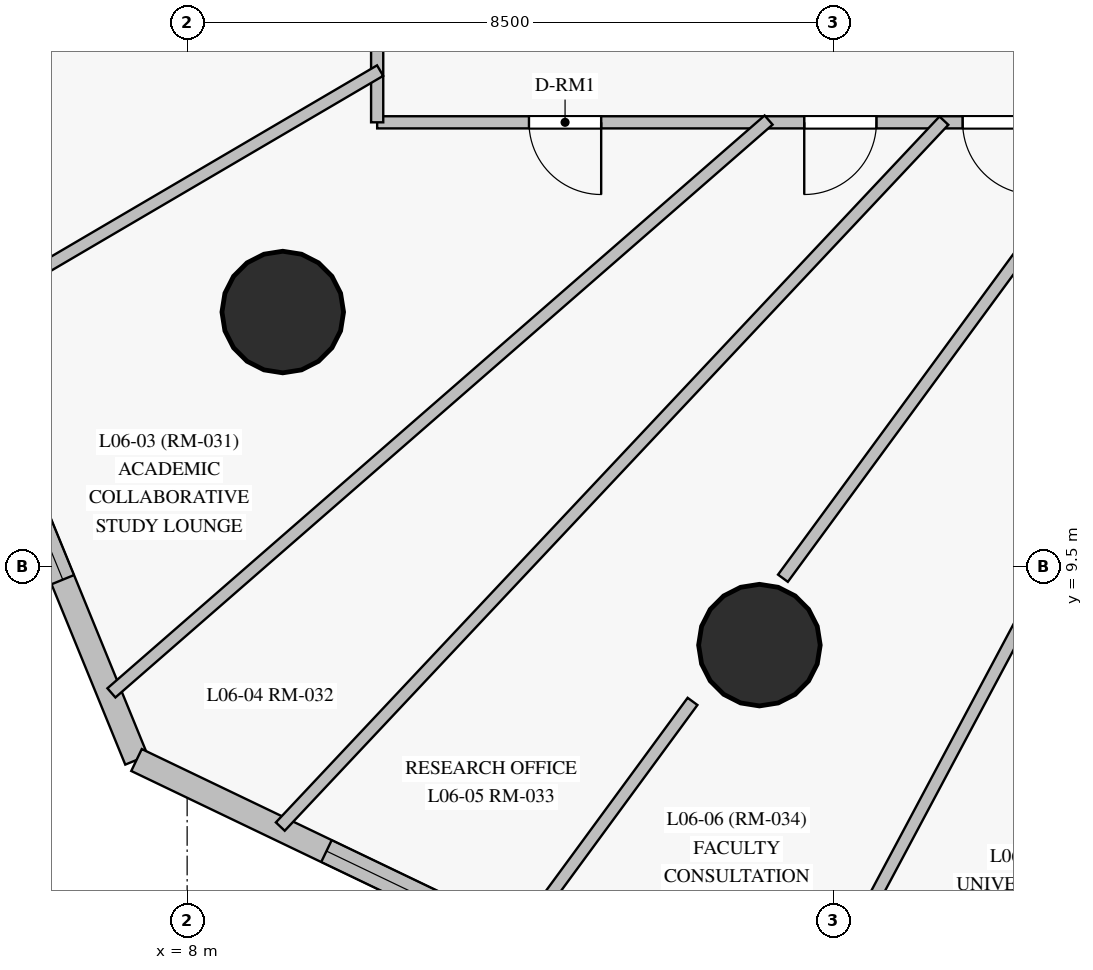
"""IFC4 building model, lengths in metres.
Left out: names, types, materials, properties, quantities, classifications, styles, units other than length and angle.
Written with IfcOpenShell. Run it as: python <this file> out.ifc"""

import sys

from ifc_helpers import new_model, si_unit, direction, frame, frame_2d, origin, origin_with_axes, origin_2d, place, context, subcontext, project, spatial, rectangle, circle, extrude, source, transform, mapped, element, fill, save


model = new_model("IFC4")
c1 = context("Model", 3, precision=1e-05, world=origin(), true_north=direction((0.0, 1.0)))
c2 = subcontext(c1, "Body", "Model", "MODEL_VIEW")
j1 = project(units=[si_unit("LENGTHUNIT", "METRE"), si_unit("PLANEANGLEUNIT", "RADIAN")], contexts=[c1])
p1 = place(None, origin())
s1 = spatial("IfcSite", under=j1, at=p1, CompositionType="ELEMENT")
p2 = place(p1, origin())
s2 = spatial("IfcBuilding", under=s1, at=p2, CompositionType="ELEMENT")
p3 = place(p2, frame((0.0, 0.0, 26.5)))
s3 = spatial("IfcBuildingStorey", under=s2, at=p3, CompositionType="ELEMENT", Elevation=26.5)
m1 = source(origin_with_axes(), c2, "Body", "SweptSolid", [
    extrude(circle(Radius=0.8, at=origin_2d()), origin(), (0.0, 0.0, 1.0), 3.6),
])
for number, where, z_axis, x_axis in (
    (1, (9.258, 12.854, 0.0), (0.0, 0.0, 1.0), (1.0, 0.0, 0.0)),
    (2, (15.529, 8.472, 0.0), (0.0, 0.0, 1.0), (1.0, 0.0, 0.0)),
):
    element("IfcColumn", number, at=place(p3, frame(where, z_axis=z_axis, x_axis=x_axis)), inside=s3, PredefinedType="COLUMN", context=c2, shape_type="MappedRepresentation", body=[
        mapped(m1, transform((0.0, 0.0, 0.0), scale=1.0)),
    ])
p4 = place(p3, frame((2.236, 19.429, 0.0), z_axis=(0.0, 0.0, 1.0), x_axis=(0.378495223181, -0.925603244392, 0.0)))
e3 = element("IfcWall", 3, at=p4, inside=s3, PredefinedType="SOLIDWALL", context=c2, shape_type="SweptSolid", body=[
    extrude(rectangle(XDim=13.47, YDim=0.32, at=frame_2d((6.735, 0.0))), origin(), (0.0, 0.0, 1.0), 3.35),
])
p5 = place(p4, frame((2.579, 0.0, 0.85)))
e4 = element("IfcOpeningElement", 4, at=p5, cuts=e3, PredefinedType="OPENING", context=c2, shape_type="SweptSolid", body=[
    extrude(rectangle(XDim=2.1, YDim=1.95, at=frame_2d((1.05, 0.975))), frame((0.0, 0.17, 0.0), z_axis=(0.0, -1.0, 0.0), x_axis=(1.0, 0.0, 0.0)), (0.0, 0.0, 1.0), 0.34),
])
p6 = place(p4, frame((8.807, 0.0, 0.85)))
e5 = element("IfcOpeningElement", 5, at=p6, cuts=e3, PredefinedType="OPENING", context=c2, shape_type="SweptSolid", body=[
    extrude(rectangle(XDim=2.1, YDim=1.95, at=frame_2d((1.05, 0.975))), frame((0.0, 0.17, 0.0), z_axis=(0.0, -1.0, 0.0), x_axis=(1.0, 0.0, 0.0)), (0.0, 0.0, 1.0), 0.34),
])
p7 = place(p3, frame((7.334, 6.961, 0.0), z_axis=(0.0, 0.0, 1.0), x_axis=(0.901738594253, -0.432281745664, 0.0)))
e6 = element("IfcWall", 6, at=p7, inside=s3, PredefinedType="SOLIDWALL", context=c2, shape_type="SweptSolid", body=[
    extrude(rectangle(XDim=10.83, YDim=0.32, at=frame_2d((5.415, 0.0))), origin(), (0.0, 0.0, 1.0), 3.35),
])
p8 = place(p7, frame((2.771, 0.0, 0.85)))
e7 = element("IfcOpeningElement", 7, at=p8, cuts=e6, PredefinedType="OPENING", context=c2, shape_type="SweptSolid", body=[
    extrude(rectangle(XDim=2.1, YDim=1.95, at=frame_2d((1.05, 0.975))), frame((0.0, 0.17, 0.0), z_axis=(0.0, -1.0, 0.0), x_axis=(1.0, 0.0, 0.0)), (0.0, 0.0, 1.0), 0.34),
])
p9 = place(p7, frame((6.439, 0.0, 0.85)))
e8 = element("IfcOpeningElement", 8, at=p9, cuts=e6, PredefinedType="OPENING", context=c2, shape_type="SweptSolid", body=[
    extrude(rectangle(XDim=2.1, YDim=1.95, at=frame_2d((1.05, 0.975))), frame((0.0, 0.17, 0.0), z_axis=(0.0, -1.0, 0.0), x_axis=(1.0, 0.0, 0.0)), (0.0, 0.0, 1.0), 0.34),
])
p10 = place(p3, frame((17.099, 2.279, 0.0), z_axis=(0.0, 0.0, 1.0), x_axis=(0.957423656835, 0.288686579759, 0.0)))
e9 = element("IfcWall", 9, at=p10, inside=s3, PredefinedType="SOLIDWALL", context=c2, shape_type="SweptSolid", body=[
    extrude(rectangle(XDim=16.276, YDim=0.32, at=frame_2d((8.138, 0.0))), origin(), (0.0, 0.0, 1.0), 3.35),
])
p11 = place(p10, frame((1.017, 0.0, 0.85)))
e10 = element("IfcOpeningElement", 10, at=p11, cuts=e9, PredefinedType="OPENING", context=c2, shape_type="SweptSolid", body=[
    extrude(rectangle(XDim=2.1, YDim=1.95, at=frame_2d((1.05, 0.975))), frame((0.0, 0.17, 0.0), z_axis=(0.0, -1.0, 0.0), x_axis=(1.0, 0.0, 0.0)), (0.0, 0.0, 1.0), 0.34),
])
p12 = place(p10, frame((5.208, 0.0, 0.85)))
e11 = element("IfcOpeningElement", 11, at=p12, cuts=e9, PredefinedType="OPENING", context=c2, shape_type="SweptSolid", body=[
    extrude(rectangle(XDim=2.1, YDim=1.95, at=frame_2d((1.05, 0.975))), frame((0.0, 0.17, 0.0), z_axis=(0.0, -1.0, 0.0), x_axis=(1.0, 0.0, 0.0)), (0.0, 0.0, 1.0), 0.34),
])
p13 = place(p10, frame((9.345, 0.0, 0.85)))
e12 = element("IfcOpeningElement", 12, at=p13, cuts=e9, PredefinedType="OPENING", context=c2, shape_type="SweptSolid", body=[
    extrude(rectangle(XDim=2.1, YDim=1.95, at=frame_2d((1.05, 0.975))), frame((0.0, 0.17, 0.0), z_axis=(0.0, -1.0, 0.0), x_axis=(1.0, 0.0, 0.0)), (0.0, 0.0, 1.0), 0.34),
])
p14 = place(p10, frame((12.855, 0.0, 0.85)))
e13 = element("IfcOpeningElement", 13, at=p14, cuts=e9, PredefinedType="OPENING", context=c2, shape_type="SweptSolid", body=[
    extrude(rectangle(XDim=2.1, YDim=1.95, at=frame_2d((1.05, 0.975))), frame((0.0, 0.17, 0.0), z_axis=(0.0, -1.0, 0.0), x_axis=(1.0, 0.0, 0.0)), (0.0, 0.0, 1.0), 0.34),
])
p15 = place(p3, frame((40.25, 15.35, 0.0), z_axis=(0.0, 0.0, 1.0), x_axis=(-1.0, 0.0, 0.0)))
e14 = element("IfcWall", 14, at=p15, inside=s3, PredefinedType="PARTITIONING", context=c2, shape_type="SweptSolid", body=[
    extrude(rectangle(XDim=29.75, YDim=0.16, at=frame_2d((14.875, 0.0))), origin(), (0.0, 0.0, 1.0), 2.7),
])
p16 = place(p15, frame((26.803, 0.0, 0.0)))
e15 = element("IfcOpeningElement", 15, at=p16, cuts=e14, PredefinedType="OPENING", context=c2, shape_type="SweptSolid", body=[
    extrude(rectangle(XDim=0.95, YDim=2.15, at=frame_2d((0.475, 1.075))), frame((0.0, 0.09, 0.0), z_axis=(0.0, -1.0, 0.0), x_axis=(1.0, 0.0, 0.0)), (0.0, 0.0, 1.0), 0.18),
])
p17 = place(p15, frame((23.181, 0.0, 0.0)))
e16 = element("IfcOpeningElement", 16, at=p17, cuts=e14, PredefinedType="OPENING", context=c2, shape_type="SweptSolid", body=[
    extrude(rectangle(XDim=0.95, YDim=2.15, at=frame_2d((0.475, 1.075))), frame((0.0, 0.09, 0.0), z_axis=(0.0, -1.0, 0.0), x_axis=(1.0, 0.0, 0.0)), (0.0, 0.0, 1.0), 0.18),
])
p18 = place(p15, frame((21.097, 0.0, 0.0)))
e17 = element("IfcOpeningElement", 17, at=p18, cuts=e14, PredefinedType="OPENING", context=c2, shape_type="SweptSolid", body=[
    extrude(rectangle(XDim=0.95, YDim=2.15, at=frame_2d((0.475, 1.075))), frame((0.0, 0.09, 0.0), z_axis=(0.0, -1.0, 0.0), x_axis=(1.0, 0.0, 0.0)), (0.0, 0.0, 1.0), 0.18),
])
p19 = place(p15, frame((18.772, 0.0, 0.0)))
e18 = element("IfcOpeningElement", 18, at=p19, cuts=e14, PredefinedType="OPENING", context=c2, shape_type="SweptSolid", body=[
    extrude(rectangle(XDim=0.95, YDim=2.15, at=frame_2d((0.475, 1.075))), frame((0.0, 0.09, 0.0), z_axis=(0.0, -1.0, 0.0), x_axis=(1.0, 0.0, 0.0)), (0.0, 0.0, 1.0), 0.18),
])
p20 = place(p15, frame((16.089, 0.0, 0.0)))
e19 = element("IfcOpeningElement", 19, at=p20, cuts=e14, PredefinedType="OPENING", context=c2, shape_type="SweptSolid", body=[
    extrude(rectangle(XDim=0.96, YDim=2.15, at=frame_2d((0.48, 1.075))), frame((0.0, 0.09, 0.0), z_axis=(0.0, -1.0, 0.0), x_axis=(1.0, 0.0, 0.0)), (0.0, 0.0, 1.0), 0.18),
])
p21 = place(p15, frame((14.21, 0.0, 0.0)))
e20 = element("IfcOpeningElement", 20, at=p21, cuts=e14, PredefinedType="OPENING", context=c2, shape_type="SweptSolid", body=[
    extrude(rectangle(XDim=0.95, YDim=2.15, at=frame_2d((0.475, 1.075))), frame((0.0, 0.09, 0.0), z_axis=(0.0, -1.0, 0.0), x_axis=(1.0, 0.0, 0.0)), (0.0, 0.0, 1.0), 0.18),
])
p22 = place(p15, frame((11.995, 0.0, 0.0)))
e21 = element("IfcOpeningElement", 21, at=p22, cuts=e14, PredefinedType="OPENING", context=c2, shape_type="SweptSolid", body=[
    extrude(rectangle(XDim=0.95, YDim=2.15, at=frame_2d((0.475, 1.075))), frame((0.0, 0.09, 0.0), z_axis=(0.0, -1.0, 0.0), x_axis=(1.0, 0.0, 0.0)), (0.0, 0.0, 1.0), 0.18),
])
p23 = place(p15, frame((10.127, 0.0, 0.0)))
e22 = element("IfcOpeningElement", 22, at=p23, cuts=e14, PredefinedType="OPENING", context=c2, shape_type="SweptSolid", body=[
    extrude(rectangle(XDim=0.96, YDim=2.15, at=frame_2d((0.48, 1.075))), frame((0.0, 0.09, 0.0), z_axis=(0.0, -1.0, 0.0), x_axis=(1.0, 0.0, 0.0)), (0.0, 0.0, 1.0), 0.18),
])
p24 = place(p15, frame((6.962, 0.0, 0.0)))
e23 = element("IfcOpeningElement", 23, at=p24, cuts=e14, PredefinedType="OPENING", context=c2, shape_type="SweptSolid", body=[
    extrude(rectangle(XDim=0.95, YDim=2.15, at=frame_2d((0.475, 1.075))), frame((0.0, 0.09, 0.0), z_axis=(0.0, -1.0, 0.0), x_axis=(1.0, 0.0, 0.0)), (0.0, 0.0, 1.0), 0.18),
])
p25 = place(p15, frame((1.325, 0.0, 0.0)))
e24 = element("IfcOpeningElement", 24, at=p25, cuts=e14, PredefinedType="OPENING", context=c2, shape_type="SweptSolid", body=[
    extrude(rectangle(XDim=0.95, YDim=2.15, at=frame_2d((0.475, 1.075))), frame((0.0, 0.09, 0.0), z_axis=(0.0, -1.0, 0.0), x_axis=(1.0, 0.0, 0.0)), (0.0, 0.0, 1.0), 0.18),
])
p26 = place(p3, frame((10.5, 15.35, 0.0), z_axis=(0.0, 0.0, 1.0), x_axis=(0.0, 1.0, 0.0)))
e25 = element("IfcWall", 25, at=p26, inside=s3, PredefinedType="PARTITIONING", context=c2, shape_type="SweptSolid", body=[
    extrude(rectangle(XDim=22.3, YDim=0.16, at=frame_2d((11.15, 0.0))), origin(), (0.0, 0.0, 1.0), 2.75),
])
p27 = place(p26, frame((7.33, 0.0, 0.0)))
e26 = element("IfcOpeningElement", 26, at=p27, cuts=e25, PredefinedType="OPENING", context=c2, shape_type="SweptSolid", body=[
    extrude(rectangle(XDim=0.95, YDim=2.15, at=frame_2d((0.475, 1.075))), frame((0.0, 0.09, 0.0), z_axis=(0.0, -1.0, 0.0), x_axis=(1.0, 0.0, 0.0)), (0.0, 0.0, 1.0), 0.18),
])
p28 = place(p26, frame((5.1, 0.0, 0.0)))
e27 = element("IfcOpeningElement", 27, at=p28, cuts=e25, PredefinedType="OPENING", context=c2, shape_type="SweptSolid", body=[
    extrude(rectangle(XDim=0.96, YDim=2.15, at=frame_2d((0.48, 1.075))), frame((0.0, 0.09, 0.0), z_axis=(0.0, -1.0, 0.0), x_axis=(1.0, 0.0, 0.0)), (0.0, 0.0, 1.0), 0.18),
])
p29 = place(p26, frame((14.61, 0.0, 0.0)))
e28 = element("IfcOpeningElement", 28, at=p29, cuts=e25, PredefinedType="OPENING", context=c2, shape_type="SweptSolid", body=[
    extrude(rectangle(XDim=0.96, YDim=2.15, at=frame_2d((0.48, 1.075))), frame((0.0, 0.09, 0.0), z_axis=(0.0, -1.0, 0.0), x_axis=(1.0, 0.0, 0.0)), (0.0, 0.0, 1.0), 0.18),
])
p30 = place(p26, frame((10.675, 0.0, 0.0)))
e29 = element("IfcOpeningElement", 29, at=p30, cuts=e25, PredefinedType="OPENING", context=c2, shape_type="SweptSolid", body=[
    extrude(rectangle(XDim=0.95, YDim=2.15, at=frame_2d((0.475, 1.075))), frame((0.0, 0.09, 0.0), z_axis=(0.0, -1.0, 0.0), x_axis=(1.0, 0.0, 0.0)), (0.0, 0.0, 1.0), 0.18),
])
p31 = place(p3, frame((22.498, 15.376, 0.0), z_axis=(0.0, 0.0, 1.0), x_axis=(-0.470669828434, -0.882309419989, 0.0)))
e30 = element("IfcWall", 30, at=p31, inside=s3, PredefinedType="PARTITIONING", context=c2, shape_type="SweptSolid", body=[
    extrude(rectangle(XDim=14.132, YDim=0.16, at=frame_2d((7.066, 0.0))), origin(), (0.0, 0.0, 1.0), 3.35),
])
p32 = place(p3, frame((17.956, 15.372, 0.0), z_axis=(0.0, 0.0, 1.0), x_axis=(-0.684954139438, -0.728586183554, 0.0)))
e31 = element("IfcWall", 31, at=p32, inside=s3, PredefinedType="PARTITIONING", context=c2, shape_type="SweptSolid", body=[
    extrude(rectangle(XDim=12.746, YDim=0.16, at=frame_2d((6.373, 0.0))), origin(), (0.0, 0.0, 1.0), 2.7),
])
p33 = place(p3, frame((15.65, 15.38, 0.0), z_axis=(0.0, 0.0, 1.0), x_axis=(-0.753853018897, -0.657043092879, 0.0)))
e32 = element("IfcWall", 32, at=p33, inside=s3, PredefinedType="PARTITIONING", context=c2, shape_type="SweptSolid", body=[
    extrude(rectangle(XDim=11.469, YDim=0.16, at=frame_2d((5.735, 0.0))), origin(), (0.0, 0.0, 1.0), 3.35),
])
p34 = place(p3, frame((20.268, 15.386, 0.0), z_axis=(0.0, 0.0, 1.0), x_axis=(-0.591743955509, -0.806125977201, 0.0)))
e33 = element("IfcWall", 33, at=p34, inside=s3, PredefinedType="PARTITIONING", context=c2, shape_type="SweptSolid", body=[
    extrude(rectangle(XDim=7.485, YDim=0.16, at=frame_2d((3.743, 0.0))), origin(), (0.0, 0.0, 1.0), 2.7),
])
p35 = place(p3, frame((10.539, 16.031, 0.0), z_axis=(0.0, 0.0, 1.0), x_axis=(-0.862473711585, -0.50610186408, 0.0)))
e34 = element("IfcWall", 34, at=p35, inside=s3, PredefinedType="PARTITIONING", context=c2, shape_type="SweptSolid", body=[
    extrude(rectangle(XDim=6.439, YDim=0.16, at=frame_2d((3.219, 0.0))), origin(), (0.0, 0.0, 1.0), 3.35),
])
p36 = place(p3, frame((14.649, 7.731, 0.0), z_axis=(0.0, 0.0, 1.0), x_axis=(-0.591711140864, -0.806150064056, 0.0)))
e35 = element("IfcWall", 35, at=p36, inside=s3, PredefinedType="PARTITIONING", context=c2, shape_type="SweptSolid", body=[
    extrude(rectangle(XDim=3.898, YDim=0.16, at=frame_2d((1.949, 0.0))), origin(), (0.0, 0.0, 1.0), 3.35),
])
m2 = source(origin_with_axes(), c2, "Body", "SweptSolid", [
    extrude(rectangle(XDim=2.1, YDim=1.95, at=frame_2d((1.05, 0.975))), frame((0.0, 0.03, 0.0), z_axis=(0.0, -1.0, 0.0), x_axis=(1.0, 0.0, 0.0)), (0.0, 0.0, 1.0), 0.06),
])
p37 = place(p6, origin())
e36 = element("IfcWindow", 36, at=p37, inside=s3, PartitioningType="SINGLE_PANEL", PredefinedType="WINDOW", context=c2, shape_type="MappedRepresentation", body=[
    mapped(m2, transform((0.0, 0.0, 0.0), scale=1.0)),
])
fill(e5, e36)
p38 = place(p8, origin())
e37 = element("IfcWindow", 37, at=p38, inside=s3, PartitioningType="SINGLE_PANEL", PredefinedType="WINDOW", context=c2, shape_type="MappedRepresentation", body=[
    mapped(m2, transform((0.0, 0.0, 0.0), scale=1.0)),
])
fill(e7, e37)
m3 = source(origin_with_axes(), c2, "Body", "SweptSolid", [
    extrude(rectangle(XDim=0.95, YDim=2.15, at=frame_2d((0.475, 1.075))), frame((0.0, 0.025, 0.0), z_axis=(0.0, -1.0, 0.0), x_axis=(1.0, 0.0, 0.0)), (0.0, 0.0, 1.0), 0.05),
])
p39 = place(p16, origin())
e38 = element("IfcDoor", 38, at=p39, inside=s3, OperationType="SINGLE_SWING_LEFT", PredefinedType="DOOR", context=c2, shape_type="MappedRepresentation", body=[
    mapped(m3, transform((0.0, 0.0, 0.0), scale=1.0)),
])
fill(e15, e38)
p40 = place(p17, origin())
e39 = element("IfcDoor", 39, at=p40, inside=s3, OperationType="SINGLE_SWING_RIGHT", PredefinedType="DOOR", context=c2, shape_type="MappedRepresentation", body=[
    mapped(m3, transform((0.0, 0.0, 0.0), scale=1.0)),
])
fill(e16, e39)
p41 = place(p18, origin())
e40 = element("IfcDoor", 40, at=p41, inside=s3, OperationType="SINGLE_SWING_LEFT", PredefinedType="DOOR", context=c2, shape_type="MappedRepresentation", body=[
    mapped(m3, transform((0.0, 0.0, 0.0), scale=1.0)),
])
fill(e17, e40)
save(model, sys.argv[1])
